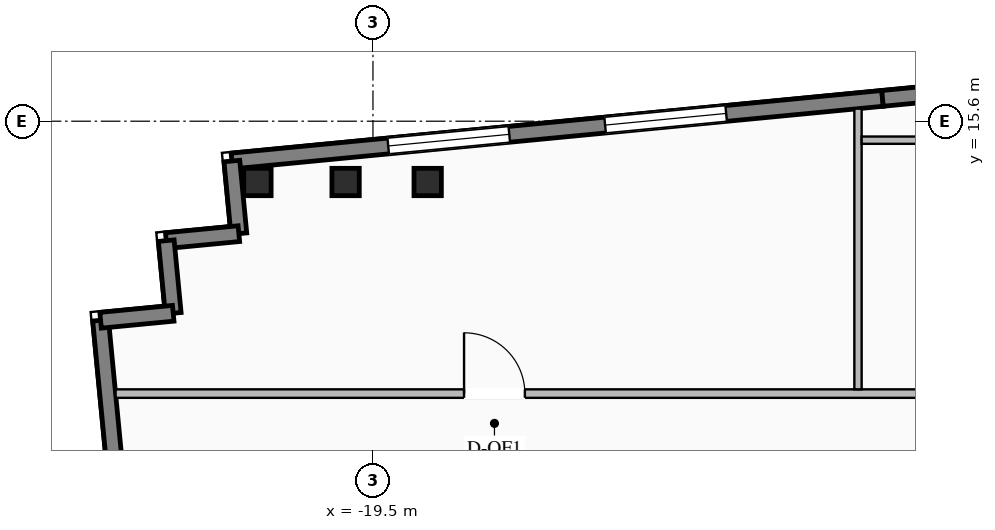
"""IFC4 building model, lengths in metres.
Left out: names, types, materials, properties, quantities, classifications, styles, units other than length and angle.
Written with IfcOpenShell. Run it as: python <this file> out.ifc"""

import sys

from ifc_helpers import new_model, si_unit, direction, frame, frame_2d, origin, origin_2d, place, context, subcontext, project, spatial, rectangle, i_section, extrude, element, fill, save


model = new_model("IFC4")
c1 = context("Model", 3, precision=1e-05, world=origin(), true_north=direction((0.0, 1.0)))
c2 = subcontext(c1, "Body", "Model", "MODEL_VIEW")
j1 = project(units=[si_unit("LENGTHUNIT", "METRE"), si_unit("PLANEANGLEUNIT", "RADIAN")], contexts=[c1])
p1 = place(None, origin())
s1 = spatial("IfcSite", under=j1, at=p1, CompositionType="ELEMENT")
p2 = place(p1, origin())
s2 = spatial("IfcBuilding", under=s1, at=p2, CompositionType="ELEMENT")
p3 = place(p2, frame((0.0, 0.0, 272.4)))
s3 = spatial("IfcBuildingStorey", under=s2, at=p3, CompositionType="ELEMENT", Elevation=272.4)
for number, where, z_axis, x_axis in (
    (1, (-21.4, 14.6, 0.0), (0.0, 0.0, 1.0), (1.0, 0.0, 0.0)),
    (2, (-19.95, 14.6, 0.0), (0.0, 0.0, 1.0), (1.0, 0.0, 0.0)),
    (3, (-18.6, 14.6, 0.0), (0.0, 0.0, 1.0), (1.0, 0.0, 0.0)),
):
    element("IfcColumn", number, at=place(p3, frame(where, z_axis=z_axis, x_axis=x_axis)), inside=s3, PredefinedType="COLUMN", context=c2, shape_type="SweptSolid", body=[
        extrude(i_section(OverallWidth=0.45, OverallDepth=0.45, WebThickness=0.022, FlangeThickness=0.032, at=origin_2d()), origin(), (0.0, 0.0, 1.0), 3.45),
    ])
p4 = place(p3, frame((-21.821, 14.945, 0.0), z_axis=(0.0, 0.0, 1.0), x_axis=(0.995394787719, 0.095860401528, 0.0)))
e4 = element("IfcWall", 4, at=p4, inside=s3, PredefinedType="STANDARD", context=c2, shape_type="SweptSolid", body=[
    extrude(rectangle(XDim=10.75, YDim=0.26, at=frame_2d((5.375, 0.0))), origin(), (0.0, 0.0, 1.0), 3.25),
])
p5 = place(p4, frame((2.583, 0.0, 0.76)))
e5 = element("IfcOpeningElement", 5, at=p5, cuts=e4, PredefinedType="OPENING", context=c2, shape_type="SweptSolid", body=[
    extrude(rectangle(XDim=2.0, YDim=2.05, at=frame_2d((1.0, 1.025))), frame((0.0, 0.14, 0.0), z_axis=(0.0, -1.0, 0.0), x_axis=(1.0, 0.0, 0.0)), (0.0, 0.0, 1.0), 0.28),
])
p6 = place(p4, frame((6.167, 0.0, 0.76)))
e6 = element("IfcOpeningElement", 6, at=p6, cuts=e4, PredefinedType="OPENING", context=c2, shape_type="SweptSolid", body=[
    extrude(rectangle(XDim=2.0, YDim=2.05, at=frame_2d((1.0, 1.025))), frame((0.0, 0.14, 0.0), z_axis=(0.0, -1.0, 0.0), x_axis=(1.0, 0.0, 0.0)), (0.0, 0.0, 1.0), 0.28),
])
p7 = place(p3, frame((-11.12, 15.975, 0.0), z_axis=(0.0, 0.0, 1.0), x_axis=(0.995396794462, 0.09583956164, 0.0)))
e7 = element("IfcWall", 7, at=p7, inside=s3, PredefinedType="STANDARD", context=c2, shape_type="SweptSolid", body=[
    extrude(rectangle(XDim=9.0, YDim=0.26, at=frame_2d((4.5, 0.0))), origin(), (0.0, 0.0, 1.0), 3.25),
])
p8 = place(p7, frame((2.0, 0.0, 0.76)))
e8 = element("IfcOpeningElement", 8, at=p8, cuts=e7, PredefinedType="OPENING", context=c2, shape_type="SweptSolid", body=[
    extrude(rectangle(XDim=2.0, YDim=2.05, at=frame_2d((1.0, 1.025))), frame((0.0, 0.14, 0.0), z_axis=(0.0, -1.0, 0.0), x_axis=(1.0, 0.0, 0.0)), (0.0, 0.0, 1.0), 0.28),
])
p9 = place(p7, frame((5.0, 0.0, 0.76)))
e9 = element("IfcOpeningElement", 9, at=p9, cuts=e7, PredefinedType="OPENING", context=c2, shape_type="SweptSolid", body=[
    extrude(rectangle(XDim=2.0, YDim=2.05, at=frame_2d((1.0, 1.025))), frame((0.0, 0.14, 0.0), z_axis=(0.0, -1.0, 0.0), x_axis=(1.0, 0.0, 0.0)), (0.0, 0.0, 1.0), 0.28),
])
p10 = place(p3, frame((-22.527, -2.754, 0.0), z_axis=(0.0, 0.0, 1.0), x_axis=(-0.095850890337, 0.995395703638, 0.0)))
e10 = element("IfcWall", 10, at=p10, inside=s3, PredefinedType="STANDARD", context=c2, shape_type="SweptSolid", body=[
    extrude(rectangle(XDim=15.15, YDim=0.26, at=frame_2d((7.575, 0.0))), origin(), (0.0, 0.0, 1.0), 3.25),
])
p11 = place(p10, frame((4.35, 0.0, 0.76)))
e11 = element("IfcOpeningElement", 11, at=p11, cuts=e10, PredefinedType="OPENING", context=c2, shape_type="SweptSolid", body=[
    extrude(rectangle(XDim=1.4, YDim=1.95, at=frame_2d((0.7, 0.975))), frame((0.0, 0.14, 0.0), z_axis=(0.0, -1.0, 0.0), x_axis=(1.0, 0.0, 0.0)), (0.0, 0.0, 1.0), 0.28),
])
p12 = place(p10, frame((9.4, 0.0, 0.76)))
e12 = element("IfcOpeningElement", 12, at=p12, cuts=e10, PredefinedType="OPENING", context=c2, shape_type="SweptSolid", body=[
    extrude(rectangle(XDim=1.4, YDim=1.95, at=frame_2d((0.7, 0.975))), frame((0.0, 0.14, 0.0), z_axis=(0.0, -1.0, 0.0), x_axis=(1.0, 0.0, 0.0)), (0.0, 0.0, 1.0), 0.28),
])
p13 = place(p3, frame((-21.821, 14.945, 0.0), z_axis=(0.0, 0.0, 1.0), x_axis=(0.096038073607, -0.995377661201, 0.0)))
e13 = element("IfcWall", 13, at=p13, inside=s3, PredefinedType="STANDARD", context=c2, shape_type="SweptSolid", body=[
    extrude(rectangle(XDim=1.2, YDim=0.26, at=frame_2d((0.6, 0.0))), origin(), (0.0, 0.0, 1.0), 2.565),
])
for number, where, z_axis, x_axis in (
    (14, (-21.705, 13.75, 0.0), (0.0, 0.0, 1.0), (-0.995, -0.096, 0.0)),
    (15, (-22.9, 13.635, 0.0), (0.0, 0.0, 1.0), (0.096, -0.995, 0.0)),
    (16, (-22.785, 12.441, 0.0), (0.0, 0.0, 1.0), (-0.995, -0.096, 0.0)),
):
    element("IfcWall", number, at=place(p3, frame(where, z_axis=z_axis, x_axis=x_axis)), inside=s3, PredefinedType="STANDARD", context=c2, shape_type="SweptSolid", body=[
        extrude(rectangle(XDim=1.2, YDim=0.26, at=frame_2d((0.6, 0.0))), origin(), (0.0, 0.0, 1.0), 2.565),
    ])
p14 = place(p3, frame((-23.733, 11.12, 0.0), z_axis=(0.0, 0.0, 1.0), x_axis=(1.0, 0.0, 0.0)))
e17 = element("IfcWall", 17, at=p14, inside=s3, PredefinedType="STANDARD", context=c2, shape_type="SweptSolid", body=[
    extrude(rectangle(XDim=53.285, YDim=0.14, at=frame_2d((26.643, 0.0))), origin(), (0.0, 0.0, 1.0), 3.25),
])
p15 = place(p14, frame((5.731, 0.0, 0.0)))
e18 = element("IfcOpeningElement", 18, at=p15, cuts=e17, PredefinedType="OPENING", context=c2, shape_type="SweptSolid", body=[
    extrude(rectangle(XDim=1.0, YDim=2.08, at=frame_2d((0.5, 1.04))), frame((0.0, 0.08, 0.0), z_axis=(0.0, -1.0, 0.0), x_axis=(1.0, 0.0, 0.0)), (0.0, 0.0, 1.0), 0.16),
])
p16 = place(p14, frame((18.9, 0.0, 0.0)))
e19 = element("IfcOpeningElement", 19, at=p16, cuts=e17, PredefinedType="OPENING", context=c2, shape_type="SweptSolid", body=[
    extrude(rectangle(XDim=1.0, YDim=2.08, at=frame_2d((0.5, 1.04))), frame((0.0, 0.08, 0.0), z_axis=(0.0, -1.0, 0.0), x_axis=(1.0, 0.0, 0.0)), (0.0, 0.0, 1.0), 0.16),
])
p17 = place(p14, frame((33.279, 0.0, 0.0)))
e20 = element("IfcOpeningElement", 20, at=p17, cuts=e17, PredefinedType="OPENING", context=c2, shape_type="SweptSolid", body=[
    extrude(rectangle(XDim=1.0, YDim=2.08, at=frame_2d((0.5, 1.04))), frame((0.0, 0.08, 0.0), z_axis=(0.0, -1.0, 0.0), x_axis=(1.0, 0.0, 0.0)), (0.0, 0.0, 1.0), 0.16),
])
p18 = place(p14, frame((46.501, 0.0, 0.0)))
e21 = element("IfcOpeningElement", 21, at=p18, cuts=e17, PredefinedType="OPENING", context=c2, shape_type="SweptSolid", body=[
    extrude(rectangle(XDim=1.0, YDim=2.08, at=frame_2d((0.5, 1.04))), frame((0.0, 0.08, 0.0), z_axis=(0.0, -1.0, 0.0), x_axis=(1.0, 0.0, 0.0)), (0.0, 0.0, 1.0), 0.16),
])
p19 = place(p3, frame((-11.523, 11.19, 0.0), z_axis=(0.0, 0.0, 1.0), x_axis=(0.0, 1.0, 0.0)))
e22 = element("IfcWall", 22, at=p19, inside=s3, PredefinedType="STANDARD", context=c2, shape_type="SweptSolid", body=[
    extrude(rectangle(XDim=4.616, YDim=0.12, at=frame_2d((2.308, 0.0))), origin(), (0.0, 0.0, 1.0), 3.25),
])
p20 = place(p3, frame((-11.463, 15.288, 0.0), z_axis=(0.0, 0.0, 1.0), x_axis=(1.0, 0.0, 0.0)))
e23 = element("IfcWall", 23, at=p20, inside=s3, PredefinedType="STANDARD", context=c2, shape_type="SweptSolid", body=[
    extrude(rectangle(XDim=28.639, YDim=0.12, at=frame_2d((14.319, 0.0))), origin(), (0.0, 0.0, 1.0), 2.565),
])
p21 = place(p20, frame((6.787, 0.0, 0.0)))
e24 = element("IfcOpeningElement", 24, at=p21, cuts=e23, PredefinedType="OPENING", context=c2, shape_type="SweptSolid", body=[
    extrude(rectangle(XDim=1.0, YDim=2.08, at=frame_2d((0.5, 1.04))), frame((0.0, 0.07, 0.0), z_axis=(0.0, -1.0, 0.0), x_axis=(1.0, 0.0, 0.0)), (0.0, 0.0, 1.0), 0.14),
])
p22 = place(p20, frame((14.824, 0.0, 0.0)))
e25 = element("IfcOpeningElement", 25, at=p22, cuts=e23, PredefinedType="OPENING", context=c2, shape_type="SweptSolid", body=[
    extrude(rectangle(XDim=1.0, YDim=2.08, at=frame_2d((0.5, 1.04))), frame((0.0, 0.07, 0.0), z_axis=(0.0, -1.0, 0.0), x_axis=(1.0, 0.0, 0.0)), (0.0, 0.0, 1.0), 0.14),
])
p23 = place(p5, origin())
e26 = element("IfcWindow", 26, at=p23, inside=s3, PartitioningType="DOUBLE_PANEL_VERTICAL", PredefinedType="WINDOW", context=c2, shape_type="SweptSolid", body=[
    extrude(rectangle(XDim=2.0, YDim=2.05, at=frame_2d((1.0, 1.025))), frame((0.0, 0.03, 0.0), z_axis=(0.0, -1.0, 0.0), x_axis=(1.0, 0.0, 0.0)), (0.0, 0.0, 1.0), 0.06),
])
fill(e5, e26)
p24 = place(p6, origin())
e27 = element("IfcWindow", 27, at=p24, inside=s3, PartitioningType="DOUBLE_PANEL_VERTICAL", PredefinedType="WINDOW", context=c2, shape_type="SweptSolid", body=[
    extrude(rectangle(XDim=2.0, YDim=2.05, at=frame_2d((1.0, 1.025))), frame((0.0, 0.03, 0.0), z_axis=(0.0, -1.0, 0.0), x_axis=(1.0, 0.0, 0.0)), (0.0, 0.0, 1.0), 0.06),
])
fill(e6, e27)
p25 = place(p15, origin())
e28 = element("IfcDoor", 28, at=p25, inside=s3, OperationType="SINGLE_SWING_LEFT", PredefinedType="DOOR", context=c2, shape_type="SweptSolid", body=[
    extrude(rectangle(XDim=1.0, YDim=2.08, at=frame_2d((0.5, 1.04))), frame((0.0, 0.025, 0.0), z_axis=(0.0, -1.0, 0.0), x_axis=(1.0, 0.0, 0.0)), (0.0, 0.0, 1.0), 0.05),
])
fill(e18, e28)
save(model, sys.argv[1])
